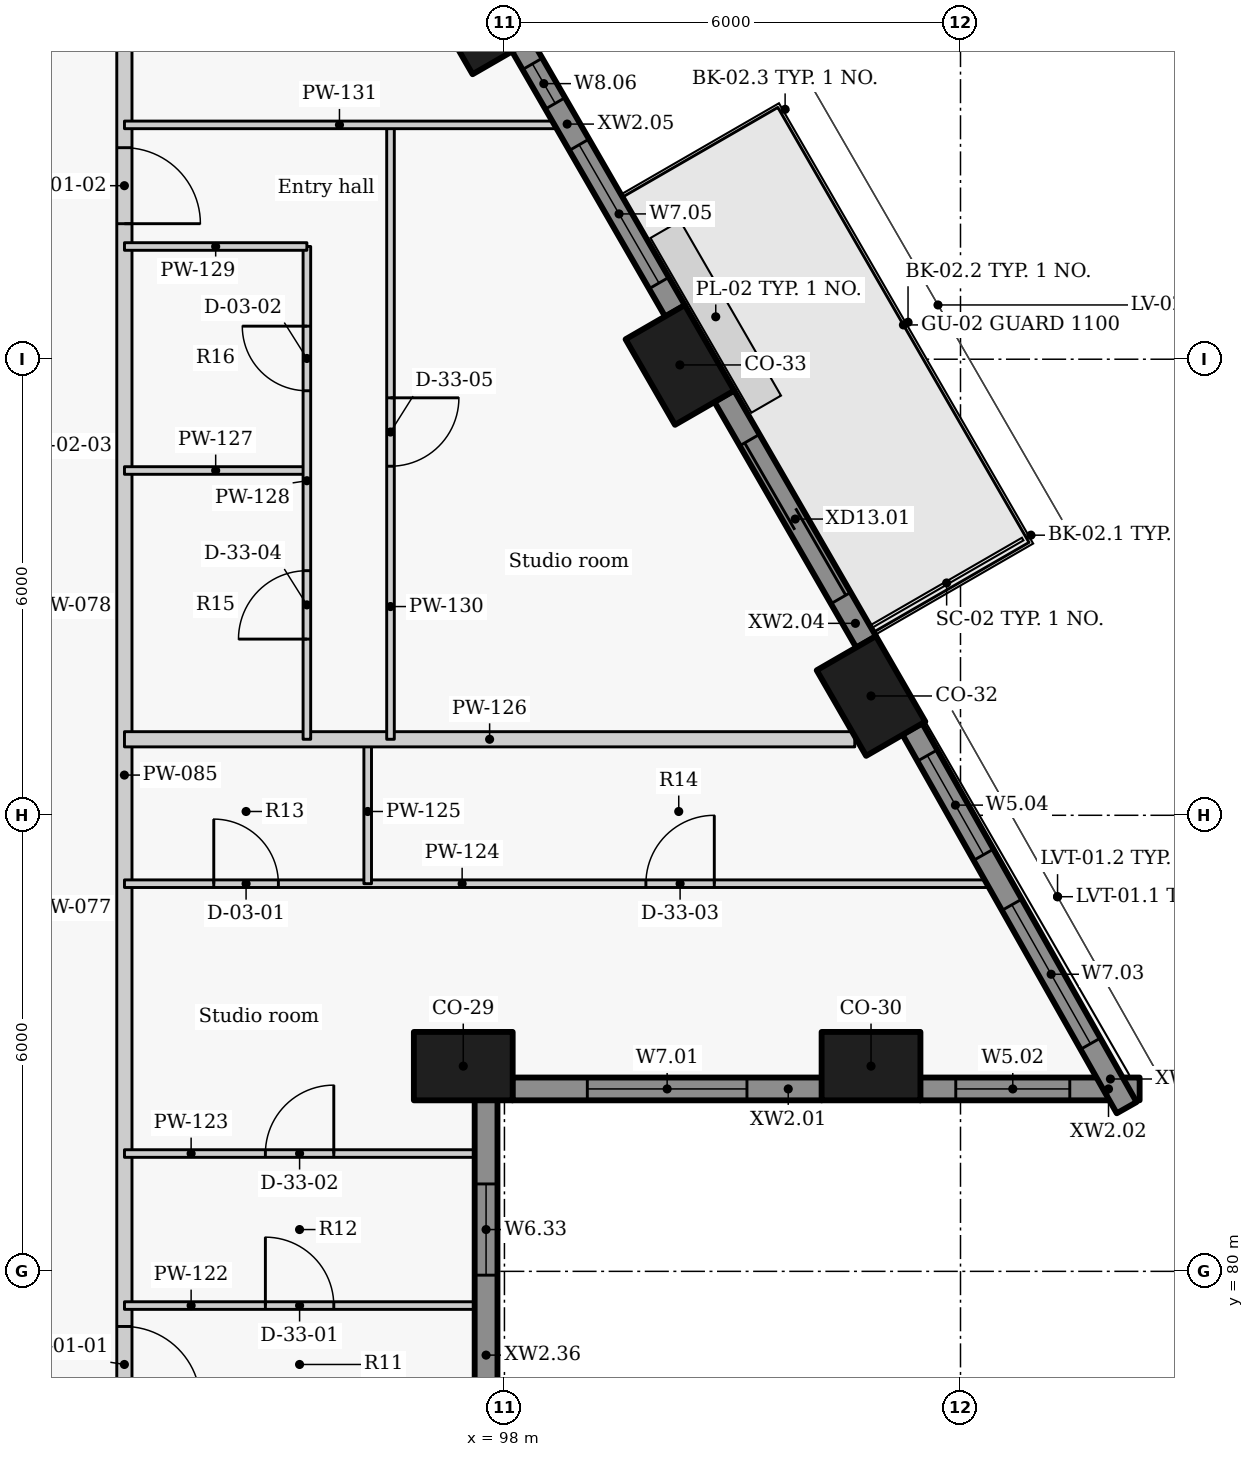
"""IFC4 building model, lengths in metres.
Left out: names, types, materials, properties, quantities, classifications, styles, units other than length and angle.
Written with IfcOpenShell. Run it as: python <this file> out.ifc"""

import sys

from ifc_helpers import new_model, si_unit, direction, frame, frame_2d, origin, origin_2d, place, context, subcontext, project, spatial, rectangle, extrude, element, fill, save


model = new_model("IFC4")
c1 = context("Model", 3, precision=1e-05, world=origin(), true_north=direction((0.0, 1.0)))
c2 = subcontext(c1, "Body", "Model", "MODEL_VIEW")
j1 = project(units=[si_unit("LENGTHUNIT", "METRE"), si_unit("PLANEANGLEUNIT", "RADIAN")], contexts=[c1])
p1 = place(None, origin())
s1 = spatial("IfcSite", under=j1, at=p1, CompositionType="ELEMENT")
p2 = place(p1, origin())
s2 = spatial("IfcBuilding", under=s1, at=p2, CompositionType="ELEMENT")
p3 = place(p2, frame((0.0, 0.0, 127.2)))
s3 = spatial("IfcBuildingStorey", under=s2, at=p3, CompositionType="ELEMENT", Elevation=127.2)
for number, where, z_axis, x_axis in (
    (1, (97.458, 82.7, 0.0), (0.0, 0.0, 1.0), (1.0, 0.0, 0.0)),
    (2, (102.823, 82.7, 0.0), (0.0, 0.0, 1.0), (1.0, 0.0, 0.0)),
    (3, (102.823, 87.57, 0.0), (0.0, 0.0, 1.0), (-0.5, 0.866, 0.0)),
    (4, (100.308, 91.925, 0.0), (0.0, 0.0, 1.0), (-0.5, 0.866, 0.0)),
    (5, (97.646, 96.537, 0.0), (0.0, 0.0, 1.0), (-0.5, 0.866, 0.0)),
):
    element("IfcColumn", number, at=place(p3, frame(where, z_axis=z_axis, x_axis=x_axis)), inside=s3, PredefinedType="COLUMN", context=c2, shape_type="SweptSolid", body=[
        extrude(rectangle(XDim=1.3, YDim=0.9, at=origin_2d()), origin(), (0.0, 0.0, 1.0), 3.3),
    ])
p4 = place(p3, frame((98.104, 82.4, 0.0), z_axis=(0.0, 0.0, 1.0), x_axis=(1.0, 0.0, 0.0)))
e6 = element("IfcWall", 6, at=p4, inside=s3, PredefinedType="SOLIDWALL", context=c2, shape_type="SweptSolid", body=[
    extrude(rectangle(XDim=4.073, YDim=0.3, at=frame_2d((2.036, 0.0))), origin(), (0.0, 0.0, 1.0), 2.425),
])
p5 = place(p4, frame((0.986, 0.0, 0.9)))
e7 = element("IfcOpeningElement", 7, at=p5, cuts=e6, PredefinedType="OPENING", context=c2, shape_type="SweptSolid", body=[
    extrude(rectangle(XDim=2.1, YDim=1.1, at=frame_2d((1.05, 0.55))), frame((0.0, 0.16, 0.0), z_axis=(0.0, -1.0, 0.0), x_axis=(1.0, 0.0, 0.0)), (0.0, 0.0, 1.0), 0.32),
])
p6 = place(p3, frame((103.469, 82.4, 0.0), z_axis=(0.0, 0.0, 1.0), x_axis=(1.0, 0.0, 0.0)))
e8 = element("IfcWall", 8, at=p6, inside=s3, PredefinedType="SOLIDWALL", context=c2, shape_type="SweptSolid", body=[
    extrude(rectangle(XDim=2.888, YDim=0.3, at=frame_2d((1.444, 0.0))), origin(), (0.0, 0.0, 1.0), 2.425),
])
p7 = place(p6, frame((0.469, 0.0, 0.9)))
e9 = element("IfcOpeningElement", 9, at=p7, cuts=e8, PredefinedType="OPENING", context=c2, shape_type="SweptSolid", body=[
    extrude(rectangle(XDim=1.5, YDim=1.1, at=frame_2d((0.75, 0.55))), frame((0.0, 0.16, 0.0), z_axis=(0.0, -1.0, 0.0), x_axis=(1.0, 0.0, 0.0)), (0.0, 0.0, 1.0), 0.32),
])
p8 = place(p3, frame((106.186, 82.153, 0.0), z_axis=(0.0, 0.0, 1.0), x_axis=(-0.492498306264, 0.87031340236, 0.0)))
e10 = element("IfcWall", 10, at=p8, inside=s3, PredefinedType="SOLIDWALL", context=c2, shape_type="SweptSolid", body=[
    extrude(rectangle(XDim=5.727, YDim=0.3, at=frame_2d((2.863, 0.0))), origin(), (0.0, 0.0, 1.0), 2.425),
])
p9 = place(p8, frame((0.967, 0.0, 0.9)))
e11 = element("IfcOpeningElement", 11, at=p9, cuts=e10, PredefinedType="OPENING", context=c2, shape_type="SweptSolid", body=[
    extrude(rectangle(XDim=2.1, YDim=1.1, at=frame_2d((1.05, 0.55))), frame((0.0, 0.16, 0.0), z_axis=(0.0, -1.0, 0.0), x_axis=(1.0, 0.0, 0.0)), (0.0, 0.0, 1.0), 0.32),
])
p10 = place(p8, frame((3.823, 0.0, 0.9)))
e12 = element("IfcOpeningElement", 12, at=p10, cuts=e10, PredefinedType="OPENING", context=c2, shape_type="SweptSolid", body=[
    extrude(rectangle(XDim=1.5, YDim=1.1, at=frame_2d((0.75, 0.55))), frame((0.0, 0.16, 0.0), z_axis=(0.0, -1.0, 0.0), x_axis=(1.0, 0.0, 0.0)), (0.0, 0.0, 1.0), 0.32),
])
p11 = place(p3, frame((102.76, 88.279, 0.0), z_axis=(0.0, 0.0, 1.0), x_axis=(-0.499933594891, 0.866063739398, 0.0)))
e13 = element("IfcWall", 13, at=p11, inside=s3, PredefinedType="SOLIDWALL", context=c2, shape_type="SweptSolid", body=[
    extrude(rectangle(XDim=3.737, YDim=0.3, at=frame_2d((1.868, 0.0))), origin(), (0.0, 0.0, 1.0), 2.425),
])
p12 = place(p11, frame((0.668, 0.0, 0.0)))
e14 = element("IfcOpeningElement", 14, at=p12, cuts=e13, PredefinedType="OPENING", context=c2, shape_type="SweptSolid", body=[
    extrude(rectangle(XDim=2.4, YDim=2.0, at=frame_2d((1.2, 1.0))), frame((0.0, 0.16, 0.0), z_axis=(0.0, -1.0, 0.0), x_axis=(1.0, 0.0, 0.0)), (0.0, 0.0, 1.0), 0.32),
])
p13 = place(p3, frame((100.245, 92.634, 0.0), z_axis=(0.0, 0.0, 1.0), x_axis=(-0.500031546601, 0.86600718958, 0.0)))
e15 = element("IfcWall", 15, at=p13, inside=s3, PredefinedType="SOLIDWALL", context=c2, shape_type="SweptSolid", body=[
    extrude(rectangle(XDim=4.034, YDim=0.3, at=frame_2d((2.017, 0.0))), origin(), (0.0, 0.0, 1.0), 2.425),
])
p14 = place(p13, frame((0.425, 0.0, 0.9)))
e16 = element("IfcOpeningElement", 16, at=p14, cuts=e15, PredefinedType="OPENING", context=c2, shape_type="SweptSolid", body=[
    extrude(rectangle(XDim=2.1, YDim=1.1, at=frame_2d((1.05, 0.55))), frame((0.0, 0.16, 0.0), z_axis=(0.0, -1.0, 0.0), x_axis=(1.0, 0.0, 0.0)), (0.0, 0.0, 1.0), 0.32),
])
p15 = place(p13, frame((3.154, 0.0, 0.9)))
e17 = element("IfcOpeningElement", 17, at=p15, cuts=e15, PredefinedType="OPENING", context=c2, shape_type="SweptSolid", body=[
    extrude(rectangle(XDim=0.6, YDim=1.1, at=frame_2d((0.3, 0.55))), frame((0.0, 0.16, 0.0), z_axis=(0.0, -1.0, 0.0), x_axis=(1.0, 0.0, 0.0)), (0.0, 0.0, 1.0), 0.32),
])
p16 = place(p3, frame((97.758, 77.946, 0.0), z_axis=(0.0, 0.0, 1.0), x_axis=(0.0, 1.0, 0.0)))
e18 = element("IfcWall", 18, at=p16, inside=s3, PredefinedType="SOLIDWALL", context=c2, shape_type="SweptSolid", body=[
    extrude(rectangle(XDim=4.308, YDim=0.3, at=frame_2d((2.154, 0.0))), origin(), (0.0, 0.0, 1.0), 2.425),
])
p17 = place(p16, frame((2.004, 0.0, 0.9)))
e19 = element("IfcOpeningElement", 19, at=p17, cuts=e18, PredefinedType="OPENING", context=c2, shape_type="SweptSolid", body=[
    extrude(rectangle(XDim=1.2, YDim=1.1, at=frame_2d((0.6, 0.55))), frame((0.0, 0.16, 0.0), z_axis=(0.0, -1.0, 0.0), x_axis=(1.0, 0.0, 0.0)), (0.0, 0.0, 1.0), 0.32),
])
p18 = place(p3, frame((93.0, 102.498, 0.0), z_axis=(0.0, 0.0, 1.0), x_axis=(0.0, -1.0, 0.0)))
e20 = element("IfcWall", 20, at=p18, inside=s3, PredefinedType="PARTITIONING", context=c2, shape_type="SweptSolid", body=[
    extrude(rectangle(XDim=45.665, YDim=0.2, at=frame_2d((22.833, 0.0))), origin(), (0.0, 0.0, 1.0), 2.405),
])
p19 = place(p18, frame((34.581, 0.0, 0.0)))
e21 = element("IfcOpeningElement", 21, at=p19, cuts=e20, PredefinedType="OPENING", context=c2, shape_type="SweptSolid", body=[
    extrude(rectangle(XDim=1.0, YDim=2.1, at=frame_2d((0.5, 1.05))), frame((0.0, 0.11, 0.0), z_axis=(0.0, -1.0, 0.0), x_axis=(1.0, 0.0, 0.0)), (0.0, 0.0, 1.0), 0.22),
])
p20 = place(p18, frame((23.223, 0.0, 0.0)))
e22 = element("IfcOpeningElement", 22, at=p20, cuts=e20, PredefinedType="OPENING", context=c2, shape_type="SweptSolid", body=[
    extrude(rectangle(XDim=1.0, YDim=2.1, at=frame_2d((0.5, 1.05))), frame((0.0, 0.11, 0.0), z_axis=(0.0, -1.0, 0.0), x_axis=(1.0, 0.0, 0.0)), (0.0, 0.0, 1.0), 0.22),
])
p21 = place(p18, frame((7.715, 0.0, 0.0)))
e23 = element("IfcOpeningElement", 23, at=p21, cuts=e20, PredefinedType="OPENING", context=c2, shape_type="SweptSolid", body=[
    extrude(rectangle(XDim=1.0, YDim=2.1, at=frame_2d((0.5, 1.05))), frame((0.0, 0.11, 0.0), z_axis=(0.0, -1.0, 0.0), x_axis=(1.0, 0.0, 0.0)), (0.0, 0.0, 1.0), 0.22),
])
p22 = place(p18, frame((3.21, 0.0, 0.0)))
e24 = element("IfcOpeningElement", 24, at=p22, cuts=e20, PredefinedType="OPENING", context=c2, shape_type="SweptSolid", body=[
    extrude(rectangle(XDim=1.0, YDim=2.1, at=frame_2d((0.5, 1.05))), frame((0.0, 0.11, 0.0), z_axis=(0.0, -1.0, 0.0), x_axis=(1.0, 0.0, 0.0)), (0.0, 0.0, 1.0), 0.22),
])
p23 = place(p3, frame((93.001, 79.55, 0.0), z_axis=(0.0, 0.0, 1.0), x_axis=(1.0, 0.0, 0.0)))
e25 = element("IfcWall", 25, at=p23, inside=s3, PredefinedType="PARTITIONING", context=c2, shape_type="SweptSolid", body=[
    extrude(rectangle(XDim=4.607, YDim=0.1, at=frame_2d((2.304, 0.0))), origin(), (0.0, 0.0, 1.0), 2.405),
])
p24 = place(p23, frame((1.854, 0.0, 0.0)))
e26 = element("IfcOpeningElement", 26, at=p24, cuts=e25, PredefinedType="OPENING", context=c2, shape_type="SweptSolid", body=[
    extrude(rectangle(XDim=0.9, YDim=2.1, at=frame_2d((0.45, 1.05))), frame((0.0, 0.06, 0.0), z_axis=(0.0, -1.0, 0.0), x_axis=(1.0, 0.0, 0.0)), (0.0, 0.0, 1.0), 0.12),
])
p25 = place(p3, frame((93.001, 81.55, 0.0), z_axis=(0.0, 0.0, 1.0), x_axis=(1.0, 0.0, 0.0)))
e27 = element("IfcWall", 27, at=p25, inside=s3, PredefinedType="PARTITIONING", context=c2, shape_type="SweptSolid", body=[
    extrude(rectangle(XDim=4.607, YDim=0.1, at=frame_2d((2.304, 0.0))), origin(), (0.0, 0.0, 1.0), 2.405),
])
p26 = place(p25, frame((1.854, 0.0, 0.0)))
e28 = element("IfcOpeningElement", 28, at=p26, cuts=e27, PredefinedType="OPENING", context=c2, shape_type="SweptSolid", body=[
    extrude(rectangle(XDim=0.9, YDim=2.1, at=frame_2d((0.45, 1.05))), frame((0.0, 0.06, 0.0), z_axis=(0.0, -1.0, 0.0), x_axis=(1.0, 0.0, 0.0)), (0.0, 0.0, 1.0), 0.12),
])
p27 = place(p3, frame((93.001, 85.1, 0.0), z_axis=(0.0, 0.0, 1.0), x_axis=(1.0, 0.0, 0.0)))
e29 = element("IfcWall", 29, at=p27, inside=s3, PredefinedType="PARTITIONING", context=c2, shape_type="SweptSolid", body=[
    extrude(rectangle(XDim=11.421, YDim=0.1, at=frame_2d((5.71, 0.0))), origin(), (0.0, 0.0, 1.0), 2.405),
])
p28 = place(p27, frame((1.175, 0.0, 0.0)))
e30 = element("IfcOpeningElement", 30, at=p28, cuts=e29, PredefinedType="OPENING", context=c2, shape_type="SweptSolid", body=[
    extrude(rectangle(XDim=0.85, YDim=2.1, at=frame_2d((0.425, 1.05))), frame((0.0, 0.06, 0.0), z_axis=(0.0, -1.0, 0.0), x_axis=(1.0, 0.0, 0.0)), (0.0, 0.0, 1.0), 0.12),
])
p29 = place(p27, frame((6.86, 0.0, 0.0)))
e31 = element("IfcOpeningElement", 31, at=p29, cuts=e29, PredefinedType="OPENING", context=c2, shape_type="SweptSolid", body=[
    extrude(rectangle(XDim=0.9, YDim=2.1, at=frame_2d((0.45, 1.05))), frame((0.0, 0.06, 0.0), z_axis=(0.0, -1.0, 0.0), x_axis=(1.0, 0.0, 0.0)), (0.0, 0.0, 1.0), 0.12),
])
p30 = place(p3, frame((96.201, 85.1, 0.0), z_axis=(0.0, 0.0, 1.0), x_axis=(0.0, 1.0, 0.0)))
e32 = element("IfcWall", 32, at=p30, inside=s3, PredefinedType="PARTITIONING", context=c2, shape_type="SweptSolid", body=[
    extrude(rectangle(XDim=1.9, YDim=0.1, at=frame_2d((0.95, 0.0))), origin(), (0.0, 0.0, 1.0), 3.025),
])
p31 = place(p3, frame((93.001, 87.0, 0.0), z_axis=(0.0, 0.0, 1.0), x_axis=(1.0, 0.0, 0.0)))
e33 = element("IfcWall", 33, at=p31, inside=s3, PredefinedType="PARTITIONING", context=c2, shape_type="SweptSolid", body=[
    extrude(rectangle(XDim=9.608, YDim=0.2, at=frame_2d((4.804, 0.0))), origin(), (0.0, 0.0, 1.0), 3.025),
])
p32 = place(p3, frame((93.001, 90.536, 0.0), z_axis=(0.0, 0.0, 1.0), x_axis=(1.0, 0.0, 0.0)))
e34 = element("IfcWall", 34, at=p32, inside=s3, PredefinedType="PARTITIONING", context=c2, shape_type="SweptSolid", body=[
    extrude(rectangle(XDim=2.4, YDim=0.1, at=frame_2d((1.2, 0.0))), origin(), (0.0, 0.0, 1.0), 3.025),
])
p33 = place(p3, frame((95.401, 87.0, 0.0), z_axis=(0.0, 0.0, 1.0), x_axis=(0.0, 1.0, 0.0)))
e35 = element("IfcWall", 35, at=p33, inside=s3, PredefinedType="PARTITIONING", context=c2, shape_type="SweptSolid", body=[
    extrude(rectangle(XDim=6.483, YDim=0.1, at=frame_2d((3.242, 0.0))), origin(), (0.0, 0.0, 1.0), 3.025),
])
p34 = place(p33, frame((1.318, 0.0, 0.0)))
e36 = element("IfcOpeningElement", 36, at=p34, cuts=e35, PredefinedType="OPENING", context=c2, shape_type="SweptSolid", body=[
    extrude(rectangle(XDim=0.9, YDim=2.1, at=frame_2d((0.45, 1.05))), frame((0.0, 0.06, 0.0), z_axis=(0.0, -1.0, 0.0), x_axis=(1.0, 0.0, 0.0)), (0.0, 0.0, 1.0), 0.12),
])
p35 = place(p33, frame((4.585, 0.0, 0.0)))
e37 = element("IfcOpeningElement", 37, at=p35, cuts=e35, PredefinedType="OPENING", context=c2, shape_type="SweptSolid", body=[
    extrude(rectangle(XDim=0.85, YDim=2.1, at=frame_2d((0.425, 1.05))), frame((0.0, 0.06, 0.0), z_axis=(0.0, -1.0, 0.0), x_axis=(1.0, 0.0, 0.0)), (0.0, 0.0, 1.0), 0.12),
])
p36 = place(p3, frame((93.001, 93.483, 0.0), z_axis=(0.0, 0.0, 1.0), x_axis=(1.0, 0.0, 0.0)))
e38 = element("IfcWall", 38, at=p36, inside=s3, PredefinedType="PARTITIONING", context=c2, shape_type="SweptSolid", body=[
    extrude(rectangle(XDim=2.4, YDim=0.1, at=frame_2d((1.2, 0.0))), origin(), (0.0, 0.0, 1.0), 3.025),
])
p37 = place(p3, frame((96.501, 95.083, 0.0), z_axis=(0.0, 0.0, 1.0), x_axis=(0.0, -1.0, 0.0)))
e39 = element("IfcWall", 39, at=p37, inside=s3, PredefinedType="PARTITIONING", context=c2, shape_type="SweptSolid", body=[
    extrude(rectangle(XDim=8.083, YDim=0.1, at=frame_2d((4.042, 0.0))), origin(), (0.0, 0.0, 1.0), 3.025),
])
p38 = place(p37, frame((3.591, 0.0, 0.0)))
e40 = element("IfcOpeningElement", 40, at=p38, cuts=e39, PredefinedType="OPENING", context=c2, shape_type="SweptSolid", body=[
    extrude(rectangle(XDim=0.9, YDim=2.1, at=frame_2d((0.45, 1.05))), frame((0.0, 0.06, 0.0), z_axis=(0.0, -1.0, 0.0), x_axis=(1.0, 0.0, 0.0)), (0.0, 0.0, 1.0), 0.12),
])
p39 = place(p3, frame((93.001, 95.083, 0.0), z_axis=(0.0, 0.0, 1.0), x_axis=(1.0, 0.0, 0.0)))
e41 = element("IfcWall", 41, at=p39, inside=s3, PredefinedType="PARTITIONING", context=c2, shape_type="SweptSolid", body=[
    extrude(rectangle(XDim=5.657, YDim=0.1, at=frame_2d((2.829, 0.0))), origin(), (0.0, 0.0, 1.0), 2.405),
])
p40 = place(p5, origin())
e42 = element("IfcWindow", 42, at=p40, inside=s3, PartitioningType="SINGLE_PANEL", PredefinedType="WINDOW", context=c2, shape_type="SweptSolid", body=[
    extrude(rectangle(XDim=2.1, YDim=1.1, at=frame_2d((1.05, 0.55))), frame((0.0, 0.03, 0.0), z_axis=(0.0, -1.0, 0.0), x_axis=(1.0, 0.0, 0.0)), (0.0, 0.0, 1.0), 0.06),
])
fill(e7, e42)
p41 = place(p7, origin())
e43 = element("IfcWindow", 43, at=p41, inside=s3, PartitioningType="SINGLE_PANEL", PredefinedType="WINDOW", context=c2, shape_type="SweptSolid", body=[
    extrude(rectangle(XDim=1.5, YDim=1.1, at=frame_2d((0.75, 0.55))), frame((0.0, 0.03, 0.0), z_axis=(0.0, -1.0, 0.0), x_axis=(1.0, 0.0, 0.0)), (0.0, 0.0, 1.0), 0.06),
])
fill(e9, e43)
p42 = place(p9, origin())
e44 = element("IfcWindow", 44, at=p42, inside=s3, PartitioningType="SINGLE_PANEL", PredefinedType="WINDOW", context=c2, shape_type="SweptSolid", body=[
    extrude(rectangle(XDim=2.1, YDim=1.1, at=frame_2d((1.05, 0.55))), frame((0.0, 0.03, 0.0), z_axis=(0.0, -1.0, 0.0), x_axis=(1.0, 0.0, 0.0)), (0.0, 0.0, 1.0), 0.06),
])
fill(e11, e44)
p43 = place(p10, origin())
e45 = element("IfcWindow", 45, at=p43, inside=s3, PartitioningType="SINGLE_PANEL", PredefinedType="WINDOW", context=c2, shape_type="SweptSolid", body=[
    extrude(rectangle(XDim=1.5, YDim=1.1, at=frame_2d((0.75, 0.55))), frame((0.0, 0.03, 0.0), z_axis=(0.0, -1.0, 0.0), x_axis=(1.0, 0.0, 0.0)), (0.0, 0.0, 1.0), 0.06),
])
fill(e12, e45)
p44 = place(p12, origin())
e46 = element("IfcDoor", 46, at=p44, inside=s3, OperationType="DOUBLE_DOOR_SLIDING", PredefinedType="DOOR", context=c2, shape_type="SweptSolid", body=[
    extrude(rectangle(XDim=2.4, YDim=2.0, at=frame_2d((1.2, 1.0))), frame((0.0, 0.025, 0.0), z_axis=(0.0, -1.0, 0.0), x_axis=(1.0, 0.0, 0.0)), (0.0, 0.0, 1.0), 0.05),
])
fill(e14, e46)
p45 = place(p14, origin())
e47 = element("IfcWindow", 47, at=p45, inside=s3, PartitioningType="SINGLE_PANEL", PredefinedType="WINDOW", context=c2, shape_type="SweptSolid", body=[
    extrude(rectangle(XDim=2.1, YDim=1.1, at=frame_2d((1.05, 0.55))), frame((0.0, 0.03, 0.0), z_axis=(0.0, -1.0, 0.0), x_axis=(1.0, 0.0, 0.0)), (0.0, 0.0, 1.0), 0.06),
])
fill(e16, e47)
p46 = place(p15, origin())
e48 = element("IfcWindow", 48, at=p46, inside=s3, PartitioningType="SINGLE_PANEL", PredefinedType="WINDOW", context=c2, shape_type="SweptSolid", body=[
    extrude(rectangle(XDim=0.6, YDim=1.1, at=frame_2d((0.3, 0.55))), frame((0.0, 0.03, 0.0), z_axis=(0.0, -1.0, 0.0), x_axis=(1.0, 0.0, 0.0)), (0.0, 0.0, 1.0), 0.06),
])
fill(e17, e48)
p47 = place(p17, origin())
e49 = element("IfcWindow", 49, at=p47, inside=s3, PartitioningType="SINGLE_PANEL", PredefinedType="WINDOW", context=c2, shape_type="SweptSolid", body=[
    extrude(rectangle(XDim=1.2, YDim=1.1, at=frame_2d((0.6, 0.55))), frame((0.0, 0.03, 0.0), z_axis=(0.0, -1.0, 0.0), x_axis=(1.0, 0.0, 0.0)), (0.0, 0.0, 1.0), 0.06),
])
fill(e19, e49)
p48 = place(p20, origin())
e50 = element("IfcDoor", 50, at=p48, inside=s3, OperationType="SINGLE_SWING_RIGHT", PredefinedType="DOOR", context=c2, shape_type="SweptSolid", body=[
    extrude(rectangle(XDim=1.0, YDim=2.1, at=frame_2d((0.5, 1.05))), frame((0.0, 0.025, 0.0), z_axis=(0.0, -1.0, 0.0), x_axis=(1.0, 0.0, 0.0)), (0.0, 0.0, 1.0), 0.05),
])
fill(e22, e50)
p49 = place(p24, origin())
e51 = element("IfcDoor", 51, at=p49, inside=s3, OperationType="SINGLE_SWING_LEFT", PredefinedType="DOOR", context=c2, shape_type="SweptSolid", body=[
    extrude(rectangle(XDim=0.9, YDim=2.1, at=frame_2d((0.45, 1.05))), frame((0.0, 0.025, 0.0), z_axis=(0.0, -1.0, 0.0), x_axis=(1.0, 0.0, 0.0)), (0.0, 0.0, 1.0), 0.05),
])
fill(e26, e51)
p50 = place(p26, origin())
e52 = element("IfcDoor", 52, at=p50, inside=s3, OperationType="SINGLE_SWING_RIGHT", PredefinedType="DOOR", context=c2, shape_type="SweptSolid", body=[
    extrude(rectangle(XDim=0.9, YDim=2.1, at=frame_2d((0.45, 1.05))), frame((0.0, 0.025, 0.0), z_axis=(0.0, -1.0, 0.0), x_axis=(1.0, 0.0, 0.0)), (0.0, 0.0, 1.0), 0.05),
])
fill(e28, e52)
p51 = place(p28, origin())
e53 = element("IfcDoor", 53, at=p51, inside=s3, OperationType="SINGLE_SWING_LEFT", PredefinedType="DOOR", context=c2, shape_type="SweptSolid", body=[
    extrude(rectangle(XDim=0.85, YDim=2.1, at=frame_2d((0.425, 1.05))), frame((0.0, 0.025, 0.0), z_axis=(0.0, -1.0, 0.0), x_axis=(1.0, 0.0, 0.0)), (0.0, 0.0, 1.0), 0.05),
])
fill(e30, e53)
p52 = place(p29, origin())
e54 = element("IfcDoor", 54, at=p52, inside=s3, OperationType="SINGLE_SWING_RIGHT", PredefinedType="DOOR", context=c2, shape_type="SweptSolid", body=[
    extrude(rectangle(XDim=0.9, YDim=2.1, at=frame_2d((0.45, 1.05))), frame((0.0, 0.025, 0.0), z_axis=(0.0, -1.0, 0.0), x_axis=(1.0, 0.0, 0.0)), (0.0, 0.0, 1.0), 0.05),
])
fill(e31, e54)
p53 = place(p21, origin())
e55 = element("IfcDoor", 55, at=p53, inside=s3, OperationType="SINGLE_SWING_RIGHT", PredefinedType="DOOR", context=c2, shape_type="SweptSolid", body=[
    extrude(rectangle(XDim=1.0, YDim=2.1, at=frame_2d((0.5, 1.05))), frame((0.0, 0.025, 0.0), z_axis=(0.0, -1.0, 0.0), x_axis=(1.0, 0.0, 0.0)), (0.0, 0.0, 1.0), 0.05),
])
fill(e23, e55)
p54 = place(p34, origin())
e56 = element("IfcDoor", 56, at=p54, inside=s3, OperationType="SINGLE_SWING_LEFT", PredefinedType="DOOR", context=c2, shape_type="SweptSolid", body=[
    extrude(rectangle(XDim=0.9, YDim=2.1, at=frame_2d((0.45, 1.05))), frame((0.0, 0.025, 0.0), z_axis=(0.0, -1.0, 0.0), x_axis=(1.0, 0.0, 0.0)), (0.0, 0.0, 1.0), 0.05),
])
fill(e36, e56)
p55 = place(p35, origin())
e57 = element("IfcDoor", 57, at=p55, inside=s3, OperationType="SINGLE_SWING_RIGHT", PredefinedType="DOOR", context=c2, shape_type="SweptSolid", body=[
    extrude(rectangle(XDim=0.85, YDim=2.1, at=frame_2d((0.425, 1.05))), frame((0.0, 0.025, 0.0), z_axis=(0.0, -1.0, 0.0), x_axis=(1.0, 0.0, 0.0)), (0.0, 0.0, 1.0), 0.05),
])
fill(e37, e57)
p56 = place(p38, origin())
e58 = element("IfcDoor", 58, at=p56, inside=s3, OperationType="SINGLE_SWING_LEFT", PredefinedType="DOOR", context=c2, shape_type="SweptSolid", body=[
    extrude(rectangle(XDim=0.9, YDim=2.1, at=frame_2d((0.45, 1.05))), frame((0.0, 0.025, 0.0), z_axis=(0.0, -1.0, 0.0), x_axis=(1.0, 0.0, 0.0)), (0.0, 0.0, 1.0), 0.05),
])
fill(e40, e58)
save(model, sys.argv[1])
